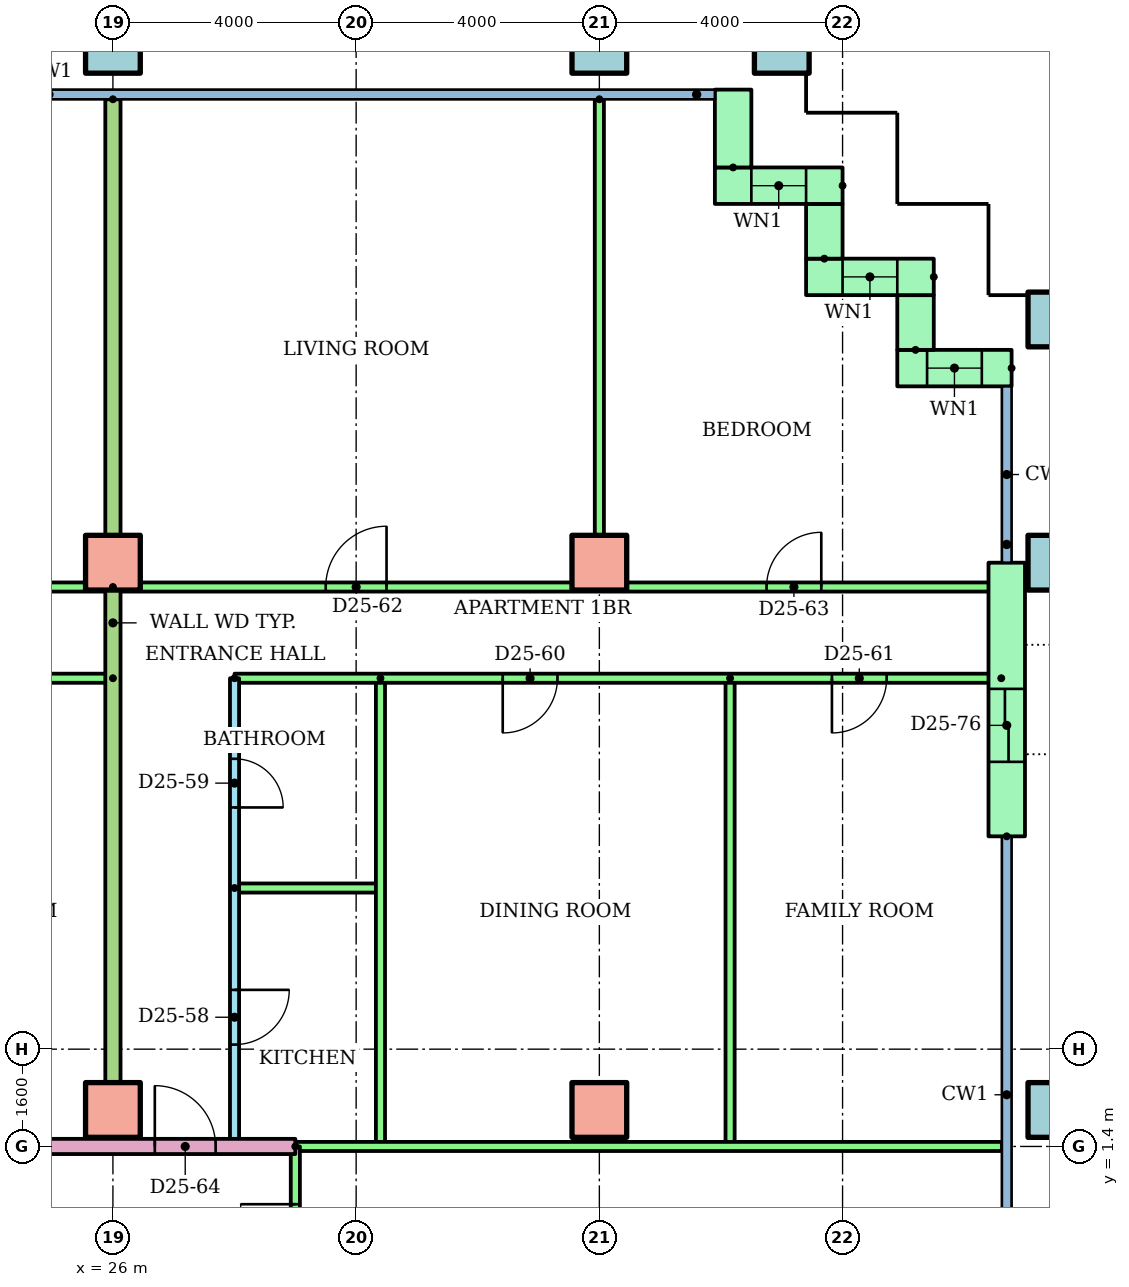
"""IFC4 building model, lengths in metres.
Left out: names, types, materials, properties, quantities, classifications, styles, units other than length and angle.
Written with IfcOpenShell. Run it as: python <this file> out.ifc"""

import sys

from ifc_helpers import new_model, si_unit, direction, frame, frame_2d, origin, origin_2d, place, context, subcontext, project, spatial, rectangle, hollow_rectangle, extrude, element, fill, save


model = new_model("IFC4")
c1 = context("Model", 3, precision=1e-05, world=origin(), true_north=direction((0.0, 1.0)))
c2 = subcontext(c1, "Body", "Model", "MODEL_VIEW")
j1 = project(units=[si_unit("LENGTHUNIT", "METRE"), si_unit("PLANEANGLEUNIT", "RADIAN")], contexts=[c1])
p1 = place(None, origin())
s1 = spatial("IfcSite", under=j1, at=p1, CompositionType="ELEMENT")
p2 = place(p1, origin())
s2 = spatial("IfcBuilding", under=s1, at=p2, CompositionType="ELEMENT")
p3 = place(p2, frame((0.0, 0.0, 96.7)))
s3 = spatial("IfcBuildingStorey", under=s2, at=p3, CompositionType="ELEMENT", Elevation=96.7)
for number, where in (
    (1, (26.0, 2.0, 0.0)),
    (2, (34.0, 2.0, 0.0)),
):
    element("IfcColumn", number, at=place(p3, frame(where)), inside=s3, PredefinedType="COLUMN", context=c2, shape_type="SweptSolid", body=[
        extrude(rectangle(XDim=0.9, YDim=0.9, at=origin_2d()), origin(), (0.0, 0.0, 1.0), 3.2),
    ])
p4 = place(p3, frame((41.5, 2.0, 0.0)))
e3 = element("IfcColumn", 3, at=p4, inside=s3, PredefinedType="COLUMN", context=c2, shape_type="SweptSolid", body=[
    extrude(hollow_rectangle(XDim=0.9, YDim=0.9, WallThickness=0.045, at=origin_2d()), origin(), (0.0, 0.0, 1.0), 3.2),
])
for number, where in (
    (4, (26.0, 11.0, 0.0)),
    (5, (34.0, 11.0, 0.0)),
):
    element("IfcColumn", number, at=place(p3, frame(where)), inside=s3, PredefinedType="COLUMN", context=c2, shape_type="SweptSolid", body=[
        extrude(rectangle(XDim=0.9, YDim=0.9, at=origin_2d()), origin(), (0.0, 0.0, 1.0), 3.2),
    ])
for number, where in (
    (6, (41.5, 11.0, 0.0)),
    (7, (41.5, 15.0, 0.0)),
    (8, (26.0, 19.5, 0.0)),
    (9, (34.0, 19.5, 0.0)),
    (10, (37.0, 19.5, 0.0)),
):
    element("IfcColumn", number, at=place(p3, frame(where)), inside=s3, PredefinedType="COLUMN", context=c2, shape_type="SweptSolid", body=[
        extrude(hollow_rectangle(XDim=0.9, YDim=0.9, WallThickness=0.045, at=origin_2d()), origin(), (0.0, 0.0, 1.0), 3.2),
    ])
p5 = place(p3, frame((40.78, 14.2, 0.0), z_axis=(0.0, 0.0, 1.0), x_axis=(-1.0, 0.0, 0.0)))
e11 = element("IfcWall", 11, at=p5, inside=s3, PredefinedType="STANDARD", context=c2, shape_type="SweptSolid", body=[
    extrude(rectangle(XDim=1.88, YDim=0.6, at=frame_2d((0.94, 0.0))), origin(), (0.0, 0.0, 1.0), 2.92),
])
p6 = place(p5, frame((0.49, 0.0, 0.9)))
e12 = element("IfcOpeningElement", 12, at=p6, cuts=e11, PredefinedType="OPENING", context=c2, shape_type="SweptSolid", body=[
    extrude(rectangle(XDim=0.9, YDim=1.5, at=frame_2d((0.45, 0.75))), frame((0.0, 0.31, 0.0), z_axis=(0.0, -1.0, 0.0), x_axis=(1.0, 0.0, 0.0)), (0.0, 0.0, 1.0), 0.62),
])
p7 = place(p3, frame((39.2, 14.5, 0.0), z_axis=(0.0, 0.0, 1.0), x_axis=(0.0, 1.0, 0.0)))
e13 = element("IfcWall", 13, at=p7, inside=s3, PredefinedType="STANDARD", context=c2, shape_type="SweptSolid", body=[
    extrude(rectangle(XDim=0.9, YDim=0.6, at=frame_2d((0.45, 0.0))), origin(), (0.0, 0.0, 1.0), 2.92),
])
p8 = place(p3, frame((39.5, 15.7, 0.0), z_axis=(0.0, 0.0, 1.0), x_axis=(-1.0, 0.0, 0.0)))
e14 = element("IfcWall", 14, at=p8, inside=s3, PredefinedType="STANDARD", context=c2, shape_type="SweptSolid", body=[
    extrude(rectangle(XDim=2.1, YDim=0.6, at=frame_2d((1.05, 0.0))), origin(), (0.0, 0.0, 1.0), 2.92),
])
p9 = place(p8, frame((0.6, 0.0, 0.9)))
e15 = element("IfcOpeningElement", 15, at=p9, cuts=e14, PredefinedType="OPENING", context=c2, shape_type="SweptSolid", body=[
    extrude(rectangle(XDim=0.9, YDim=1.5, at=frame_2d((0.45, 0.75))), frame((0.0, 0.31, 0.0), z_axis=(0.0, -1.0, 0.0), x_axis=(1.0, 0.0, 0.0)), (0.0, 0.0, 1.0), 0.62),
])
p10 = place(p3, frame((37.7, 16.0, 0.0), z_axis=(0.0, 0.0, 1.0), x_axis=(0.0, 1.0, 0.0)))
e16 = element("IfcWall", 16, at=p10, inside=s3, PredefinedType="STANDARD", context=c2, shape_type="SweptSolid", body=[
    extrude(rectangle(XDim=0.9, YDim=0.6, at=frame_2d((0.45, 0.0))), origin(), (0.0, 0.0, 1.0), 2.92),
])
p11 = place(p3, frame((38.0, 17.2, 0.0), z_axis=(0.0, 0.0, 1.0), x_axis=(-1.0, 0.0, 0.0)))
e17 = element("IfcWall", 17, at=p11, inside=s3, PredefinedType="STANDARD", context=c2, shape_type="SweptSolid", body=[
    extrude(rectangle(XDim=2.1, YDim=0.6, at=frame_2d((1.05, 0.0))), origin(), (0.0, 0.0, 1.0), 2.92),
])
p12 = place(p11, frame((0.6, 0.0, 0.9)))
e18 = element("IfcOpeningElement", 18, at=p12, cuts=e17, PredefinedType="OPENING", context=c2, shape_type="SweptSolid", body=[
    extrude(rectangle(XDim=0.9, YDim=1.5, at=frame_2d((0.45, 0.75))), frame((0.0, 0.31, 0.0), z_axis=(0.0, -1.0, 0.0), x_axis=(1.0, 0.0, 0.0)), (0.0, 0.0, 1.0), 0.62),
])
p13 = place(p3, frame((36.2, 17.5, 0.0), z_axis=(0.0, 0.0, 1.0), x_axis=(0.0, 1.0, 0.0)))
e19 = element("IfcWall", 19, at=p13, inside=s3, PredefinedType="STANDARD", context=c2, shape_type="SweptSolid", body=[
    extrude(rectangle(XDim=1.28, YDim=0.6, at=frame_2d((0.64, 0.0))), origin(), (0.0, 0.0, 1.0), 2.92),
])
p14 = place(p3, frame((40.7, 6.5, 0.0), z_axis=(0.0, 0.0, 1.0), x_axis=(0.0, 1.0, 0.0)))
e20 = element("IfcWall", 20, at=p14, inside=s3, PredefinedType="STANDARD", context=c2, shape_type="SweptSolid", body=[
    extrude(rectangle(XDim=4.5, YDim=0.6, at=frame_2d((2.25, 0.0))), origin(), (0.0, 0.0, 1.0), 2.92),
])
p15 = place(p14, frame((1.225, 0.0, 0.0)))
e21 = element("IfcOpeningElement", 21, at=p15, cuts=e20, PredefinedType="OPENING", context=c2, shape_type="SweptSolid", body=[
    extrude(rectangle(XDim=1.2, YDim=2.1, at=frame_2d((0.6, 1.05))), frame((0.0, 0.31, 0.0), z_axis=(0.0, -1.0, 0.0), x_axis=(1.0, 0.0, 0.0)), (0.0, 0.0, 1.0), 0.62),
])
p16 = place(p3, frame((26.0, 9.1, 0.0), z_axis=(0.0, 0.0, 1.0), x_axis=(-1.0, 0.0, 0.0)))
e22 = element("IfcWall", 22, at=p16, inside=s3, PredefinedType="PARTITIONING", context=c2, shape_type="SweptSolid", body=[
    extrude(rectangle(XDim=10.0, YDim=0.15, at=frame_2d((5.0, 0.0))), origin(), (0.0, 0.0, 1.0), 2.4),
])
p17 = place(p16, frame((5.525, 0.0, 0.0)))
e23 = element("IfcOpeningElement", 23, at=p17, cuts=e22, PredefinedType="OPENING", context=c2, shape_type="SweptSolid", body=[
    extrude(rectangle(XDim=0.9, YDim=2.1, at=frame_2d((0.45, 1.05))), frame((0.0, 0.085, 0.0), z_axis=(0.0, -1.0, 0.0), x_axis=(1.0, 0.0, 0.0)), (0.0, 0.0, 1.0), 0.17),
])
p18 = place(p16, frame((1.725, 0.0, 0.0)))
e24 = element("IfcOpeningElement", 24, at=p18, cuts=e22, PredefinedType="OPENING", context=c2, shape_type="SweptSolid", body=[
    extrude(rectangle(XDim=0.9, YDim=2.1, at=frame_2d((0.45, 1.05))), frame((0.0, 0.085, 0.0), z_axis=(0.0, -1.0, 0.0), x_axis=(1.0, 0.0, 0.0)), (0.0, 0.0, 1.0), 0.17),
])
p19 = place(p3, frame((14.0, 10.6, 0.0)))
e25 = element("IfcWall", 25, at=p19, inside=s3, PredefinedType="PARTITIONING", context=c2, shape_type="SweptSolid", body=[
    extrude(rectangle(XDim=12.0, YDim=0.15, at=frame_2d((6.0, 0.0))), origin(), (0.0, 0.0, 1.0), 2.4),
])
p20 = place(p19, frame((1.5, 0.0, 0.0)))
e26 = element("IfcOpeningElement", 26, at=p20, cuts=e25, PredefinedType="OPENING", context=c2, shape_type="SweptSolid", body=[
    extrude(rectangle(XDim=1.0, YDim=2.1, at=frame_2d((0.5, 1.05))), frame((0.0, 0.085, 0.0), z_axis=(0.0, -1.0, 0.0), x_axis=(1.0, 0.0, 0.0)), (0.0, 0.0, 1.0), 0.17),
])
p21 = place(p19, frame((7.5, 0.0, 0.0)))
e27 = element("IfcOpeningElement", 27, at=p21, cuts=e25, PredefinedType="OPENING", context=c2, shape_type="SweptSolid", body=[
    extrude(rectangle(XDim=1.0, YDim=2.1, at=frame_2d((0.5, 1.05))), frame((0.0, 0.085, 0.0), z_axis=(0.0, -1.0, 0.0), x_axis=(1.0, 0.0, 0.0)), (0.0, 0.0, 1.0), 0.17),
])
p22 = place(p3, frame((28.0, 9.1, 0.0), z_axis=(0.0, 0.0, 1.0), x_axis=(0.0, -1.0, 0.0)))
e28 = element("IfcWall", 28, at=p22, inside=s3, PredefinedType="PARTITIONING", context=c2, shape_type="SweptSolid", body=[
    extrude(rectangle(XDim=7.7, YDim=0.15, at=frame_2d((3.85, 0.0))), origin(), (0.0, 0.0, 1.0), 2.4),
])
p23 = place(p22, frame((5.125, 0.0, 0.0)))
e29 = element("IfcOpeningElement", 29, at=p23, cuts=e28, PredefinedType="OPENING", context=c2, shape_type="SweptSolid", body=[
    extrude(rectangle(XDim=0.9, YDim=2.1, at=frame_2d((0.45, 1.05))), frame((0.0, 0.085, 0.0), z_axis=(0.0, -1.0, 0.0), x_axis=(1.0, 0.0, 0.0)), (0.0, 0.0, 1.0), 0.17),
])
p24 = place(p22, frame((1.325, 0.0, 0.0)))
e30 = element("IfcOpeningElement", 30, at=p24, cuts=e28, PredefinedType="OPENING", context=c2, shape_type="SweptSolid", body=[
    extrude(rectangle(XDim=0.8, YDim=2.1, at=frame_2d((0.4, 1.05))), frame((0.0, 0.085, 0.0), z_axis=(0.0, -1.0, 0.0), x_axis=(1.0, 0.0, 0.0)), (0.0, 0.0, 1.0), 0.17),
])
p25 = place(p3, frame((28.0, 5.65, 0.0)))
e31 = element("IfcWall", 31, at=p25, inside=s3, PredefinedType="PARTITIONING", context=c2, shape_type="SweptSolid", body=[
    extrude(rectangle(XDim=2.4, YDim=0.15, at=frame_2d((1.2, 0.0))), origin(), (0.0, 0.0, 1.0), 2.4),
])
for number, where, z_axis, x_axis in (
    (32, (30.4, 9.1, 0.0), (0.0, 0.0, 1.0), (0.0, -1.0, 0.0)),
    (33, (36.15, 9.1, 0.0), (0.0, 0.0, 1.0), (0.0, -1.0, 0.0)),
):
    element("IfcWall", number, at=place(p3, frame(where, z_axis=z_axis, x_axis=x_axis)), inside=s3, PredefinedType="PARTITIONING", context=c2, shape_type="SweptSolid", body=[
        extrude(rectangle(XDim=7.7, YDim=0.15, at=frame_2d((3.85, 0.0))), origin(), (0.0, 0.0, 1.0), 2.4),
    ])
p26 = place(p3, frame((40.61, 9.1, 0.0), z_axis=(0.0, 0.0, 1.0), x_axis=(-1.0, 0.0, 0.0)))
e34 = element("IfcWall", 34, at=p26, inside=s3, PredefinedType="PARTITIONING", context=c2, shape_type="SweptSolid", body=[
    extrude(rectangle(XDim=12.61, YDim=0.15, at=frame_2d((6.305, 0.0))), origin(), (0.0, 0.0, 1.0), 2.4),
])
p27 = place(p26, frame((7.299, 0.0, 0.0)))
e35 = element("IfcOpeningElement", 35, at=p27, cuts=e34, PredefinedType="OPENING", context=c2, shape_type="SweptSolid", body=[
    extrude(rectangle(XDim=0.9, YDim=2.1, at=frame_2d((0.45, 1.05))), frame((0.0, 0.085, 0.0), z_axis=(0.0, -1.0, 0.0), x_axis=(1.0, 0.0, 0.0)), (0.0, 0.0, 1.0), 0.17),
])
p28 = place(p26, frame((1.885, 0.0, 0.0)))
e36 = element("IfcOpeningElement", 36, at=p28, cuts=e34, PredefinedType="OPENING", context=c2, shape_type="SweptSolid", body=[
    extrude(rectangle(XDim=0.9, YDim=2.1, at=frame_2d((0.45, 1.05))), frame((0.0, 0.085, 0.0), z_axis=(0.0, -1.0, 0.0), x_axis=(1.0, 0.0, 0.0)), (0.0, 0.0, 1.0), 0.17),
])
p29 = place(p3, frame((26.0, 10.6, 0.0)))
e37 = element("IfcWall", 37, at=p29, inside=s3, PredefinedType="PARTITIONING", context=c2, shape_type="SweptSolid", body=[
    extrude(rectangle(XDim=14.61, YDim=0.15, at=frame_2d((7.305, 0.0))), origin(), (0.0, 0.0, 1.0), 2.4),
])
p30 = place(p29, frame((3.5, 0.0, 0.0)))
e38 = element("IfcOpeningElement", 38, at=p30, cuts=e37, PredefinedType="OPENING", context=c2, shape_type="SweptSolid", body=[
    extrude(rectangle(XDim=1.0, YDim=2.1, at=frame_2d((0.5, 1.05))), frame((0.0, 0.085, 0.0), z_axis=(0.0, -1.0, 0.0), x_axis=(1.0, 0.0, 0.0)), (0.0, 0.0, 1.0), 0.17),
])
p31 = place(p29, frame((10.75, 0.0, 0.0)))
e39 = element("IfcOpeningElement", 39, at=p31, cuts=e37, PredefinedType="OPENING", context=c2, shape_type="SweptSolid", body=[
    extrude(rectangle(XDim=0.9, YDim=2.1, at=frame_2d((0.45, 1.05))), frame((0.0, 0.085, 0.0), z_axis=(0.0, -1.0, 0.0), x_axis=(1.0, 0.0, 0.0)), (0.0, 0.0, 1.0), 0.17),
])
p32 = place(p3, frame((34.0, 18.621, 0.0), z_axis=(0.0, 0.0, 1.0), x_axis=(0.0, -1.0, 0.0)))
e40 = element("IfcWall", 40, at=p32, inside=s3, PredefinedType="PARTITIONING", context=c2, shape_type="SweptSolid", body=[
    extrude(rectangle(XDim=8.021, YDim=0.15, at=frame_2d((4.01, 0.0))), origin(), (0.0, 0.0, 1.0), 2.4),
])
p33 = place(p3, frame((26.0, 18.621, 0.0), z_axis=(0.0, 0.0, 1.0), x_axis=(0.0, -1.0, 0.0)))
e41 = element("IfcWall", 41, at=p33, inside=s3, PredefinedType="PARTITIONING", context=c2, shape_type="SweptSolid", body=[
    extrude(rectangle(XDim=17.221, YDim=0.25, at=frame_2d((8.611, 0.0))), origin(), (0.0, 0.0, 1.0), 2.4),
])
p34 = place(p3, frame((14.0, 1.4, 0.0)))
e42 = element("IfcWall", 42, at=p34, inside=s3, PredefinedType="PARTITIONING", context=c2, shape_type="SweptSolid", body=[
    extrude(rectangle(XDim=15.0, YDim=0.25, at=frame_2d((7.5, 0.0))), origin(), (0.0, 0.0, 1.0), 2.4),
])
p35 = place(p34, frame((0.5, 0.0, 0.0)))
e43 = element("IfcOpeningElement", 43, at=p35, cuts=e42, PredefinedType="OPENING", context=c2, shape_type="SweptSolid", body=[
    extrude(rectangle(XDim=1.0, YDim=2.1, at=frame_2d((0.5, 1.05))), frame((0.0, 0.135, 0.0), z_axis=(0.0, -1.0, 0.0), x_axis=(1.0, 0.0, 0.0)), (0.0, 0.0, 1.0), 0.27),
])
p36 = place(p34, frame((12.689, 0.0, 0.0)))
e44 = element("IfcOpeningElement", 44, at=p36, cuts=e42, PredefinedType="OPENING", context=c2, shape_type="SweptSolid", body=[
    extrude(rectangle(XDim=1.0, YDim=2.1, at=frame_2d((0.5, 1.05))), frame((0.0, 0.135, 0.0), z_axis=(0.0, -1.0, 0.0), x_axis=(1.0, 0.0, 0.0)), (0.0, 0.0, 1.0), 0.27),
])
p37 = place(p3, frame((29.0, 1.4, 0.0)))
e45 = element("IfcWall", 45, at=p37, inside=s3, PredefinedType="PARTITIONING", context=c2, shape_type="SweptSolid", body=[
    extrude(rectangle(XDim=11.62, YDim=0.15, at=frame_2d((5.81, 0.0))), origin(), (0.0, 0.0, 1.0), 2.4),
])
p38 = place(p3, frame((29.0, -1.4, 0.0), z_axis=(0.0, 0.0, 1.0), x_axis=(0.0, 1.0, 0.0)))
e46 = element("IfcWall", 46, at=p38, inside=s3, PredefinedType="PARTITIONING", context=c2, shape_type="SweptSolid", body=[
    extrude(rectangle(XDim=2.8, YDim=0.15, at=frame_2d((1.4, 0.0))), origin(), (0.0, 0.0, 1.0), 2.4),
])
p39 = place(p38, frame((0.95, 0.0, 0.0)))
e47 = element("IfcOpeningElement", 47, at=p39, cuts=e46, PredefinedType="OPENING", context=c2, shape_type="SweptSolid", body=[
    extrude(rectangle(XDim=0.9, YDim=2.1, at=frame_2d((0.45, 1.05))), frame((0.0, 0.085, 0.0), z_axis=(0.0, -1.0, 0.0), x_axis=(1.0, 0.0, 0.0)), (0.0, 0.0, 1.0), 0.17),
])
p40 = place(p6, origin())
e48 = element("IfcWindow", 48, at=p40, inside=s3, PartitioningType="SINGLE_PANEL", PredefinedType="WINDOW", context=c2, shape_type="SweptSolid", body=[
    extrude(rectangle(XDim=0.9, YDim=1.5, at=frame_2d((0.45, 0.75))), frame((0.0, 0.03, 0.0), z_axis=(0.0, -1.0, 0.0), x_axis=(1.0, 0.0, 0.0)), (0.0, 0.0, 1.0), 0.06),
])
fill(e12, e48)
p41 = place(p9, origin())
e49 = element("IfcWindow", 49, at=p41, inside=s3, PartitioningType="SINGLE_PANEL", PredefinedType="WINDOW", context=c2, shape_type="SweptSolid", body=[
    extrude(rectangle(XDim=0.9, YDim=1.5, at=frame_2d((0.45, 0.75))), frame((0.0, 0.03, 0.0), z_axis=(0.0, -1.0, 0.0), x_axis=(1.0, 0.0, 0.0)), (0.0, 0.0, 1.0), 0.06),
])
fill(e15, e49)
p42 = place(p12, origin())
e50 = element("IfcWindow", 50, at=p42, inside=s3, PartitioningType="SINGLE_PANEL", PredefinedType="WINDOW", context=c2, shape_type="SweptSolid", body=[
    extrude(rectangle(XDim=0.9, YDim=1.5, at=frame_2d((0.45, 0.75))), frame((0.0, 0.03, 0.0), z_axis=(0.0, -1.0, 0.0), x_axis=(1.0, 0.0, 0.0)), (0.0, 0.0, 1.0), 0.06),
])
fill(e18, e50)
p43 = place(p23, origin())
e51 = element("IfcDoor", 51, at=p43, inside=s3, OperationType="SINGLE_SWING_LEFT", PredefinedType="DOOR", context=c2, shape_type="SweptSolid", body=[
    extrude(rectangle(XDim=0.9, YDim=2.1, at=frame_2d((0.45, 1.05))), frame((0.0, 0.025, 0.0), z_axis=(0.0, -1.0, 0.0), x_axis=(1.0, 0.0, 0.0)), (0.0, 0.0, 1.0), 0.05),
])
fill(e29, e51)
p44 = place(p24, origin())
e52 = element("IfcDoor", 52, at=p44, inside=s3, OperationType="SINGLE_SWING_RIGHT", PredefinedType="DOOR", context=c2, shape_type="SweptSolid", body=[
    extrude(rectangle(XDim=0.8, YDim=2.1, at=frame_2d((0.4, 1.05))), frame((0.0, 0.025, 0.0), z_axis=(0.0, -1.0, 0.0), x_axis=(1.0, 0.0, 0.0)), (0.0, 0.0, 1.0), 0.05),
])
fill(e30, e52)
p45 = place(p27, origin())
e53 = element("IfcDoor", 53, at=p45, inside=s3, OperationType="SINGLE_SWING_RIGHT", PredefinedType="DOOR", context=c2, shape_type="SweptSolid", body=[
    extrude(rectangle(XDim=0.9, YDim=2.1, at=frame_2d((0.45, 1.05))), frame((0.0, 0.025, 0.0), z_axis=(0.0, -1.0, 0.0), x_axis=(1.0, 0.0, 0.0)), (0.0, 0.0, 1.0), 0.05),
])
fill(e35, e53)
p46 = place(p28, origin())
e54 = element("IfcDoor", 54, at=p46, inside=s3, OperationType="SINGLE_SWING_RIGHT", PredefinedType="DOOR", context=c2, shape_type="SweptSolid", body=[
    extrude(rectangle(XDim=0.9, YDim=2.1, at=frame_2d((0.45, 1.05))), frame((0.0, 0.025, 0.0), z_axis=(0.0, -1.0, 0.0), x_axis=(1.0, 0.0, 0.0)), (0.0, 0.0, 1.0), 0.05),
])
fill(e36, e54)
p47 = place(p30, origin())
e55 = element("IfcDoor", 55, at=p47, inside=s3, OperationType="SINGLE_SWING_RIGHT", PredefinedType="DOOR", context=c2, shape_type="SweptSolid", body=[
    extrude(rectangle(XDim=1.0, YDim=2.1, at=frame_2d((0.5, 1.05))), frame((0.0, 0.025, 0.0), z_axis=(0.0, -1.0, 0.0), x_axis=(1.0, 0.0, 0.0)), (0.0, 0.0, 1.0), 0.05),
])
fill(e38, e55)
p48 = place(p31, origin())
e56 = element("IfcDoor", 56, at=p48, inside=s3, OperationType="SINGLE_SWING_RIGHT", PredefinedType="DOOR", context=c2, shape_type="SweptSolid", body=[
    extrude(rectangle(XDim=0.9, YDim=2.1, at=frame_2d((0.45, 1.05))), frame((0.0, 0.025, 0.0), z_axis=(0.0, -1.0, 0.0), x_axis=(1.0, 0.0, 0.0)), (0.0, 0.0, 1.0), 0.05),
])
fill(e39, e56)
p49 = place(p36, origin())
e57 = element("IfcDoor", 57, at=p49, inside=s3, OperationType="SINGLE_SWING_LEFT", PredefinedType="DOOR", context=c2, shape_type="SweptSolid", body=[
    extrude(rectangle(XDim=1.0, YDim=2.1, at=frame_2d((0.5, 1.05))), frame((0.0, 0.025, 0.0), z_axis=(0.0, -1.0, 0.0), x_axis=(1.0, 0.0, 0.0)), (0.0, 0.0, 1.0), 0.05),
])
fill(e44, e57)
p50 = place(p39, origin())
e58 = element("IfcDoor", 58, at=p50, inside=s3, OperationType="SINGLE_SWING_RIGHT", PredefinedType="DOOR", context=c2, shape_type="SweptSolid", body=[
    extrude(rectangle(XDim=0.9, YDim=2.1, at=frame_2d((0.45, 1.05))), frame((0.0, 0.025, 0.0), z_axis=(0.0, -1.0, 0.0), x_axis=(1.0, 0.0, 0.0)), (0.0, 0.0, 1.0), 0.05),
])
fill(e47, e58)
p51 = place(p15, origin())
e59 = element("IfcDoor", 59, at=p51, inside=s3, OperationType="SLIDING_TO_LEFT", PredefinedType="DOOR", context=c2, shape_type="SweptSolid", body=[
    extrude(rectangle(XDim=1.2, YDim=2.1, at=frame_2d((0.6, 1.05))), frame((0.0, 0.025, 0.0), z_axis=(0.0, -1.0, 0.0), x_axis=(1.0, 0.0, 0.0)), (0.0, 0.0, 1.0), 0.05),
])
fill(e21, e59)
save(model, sys.argv[1])
